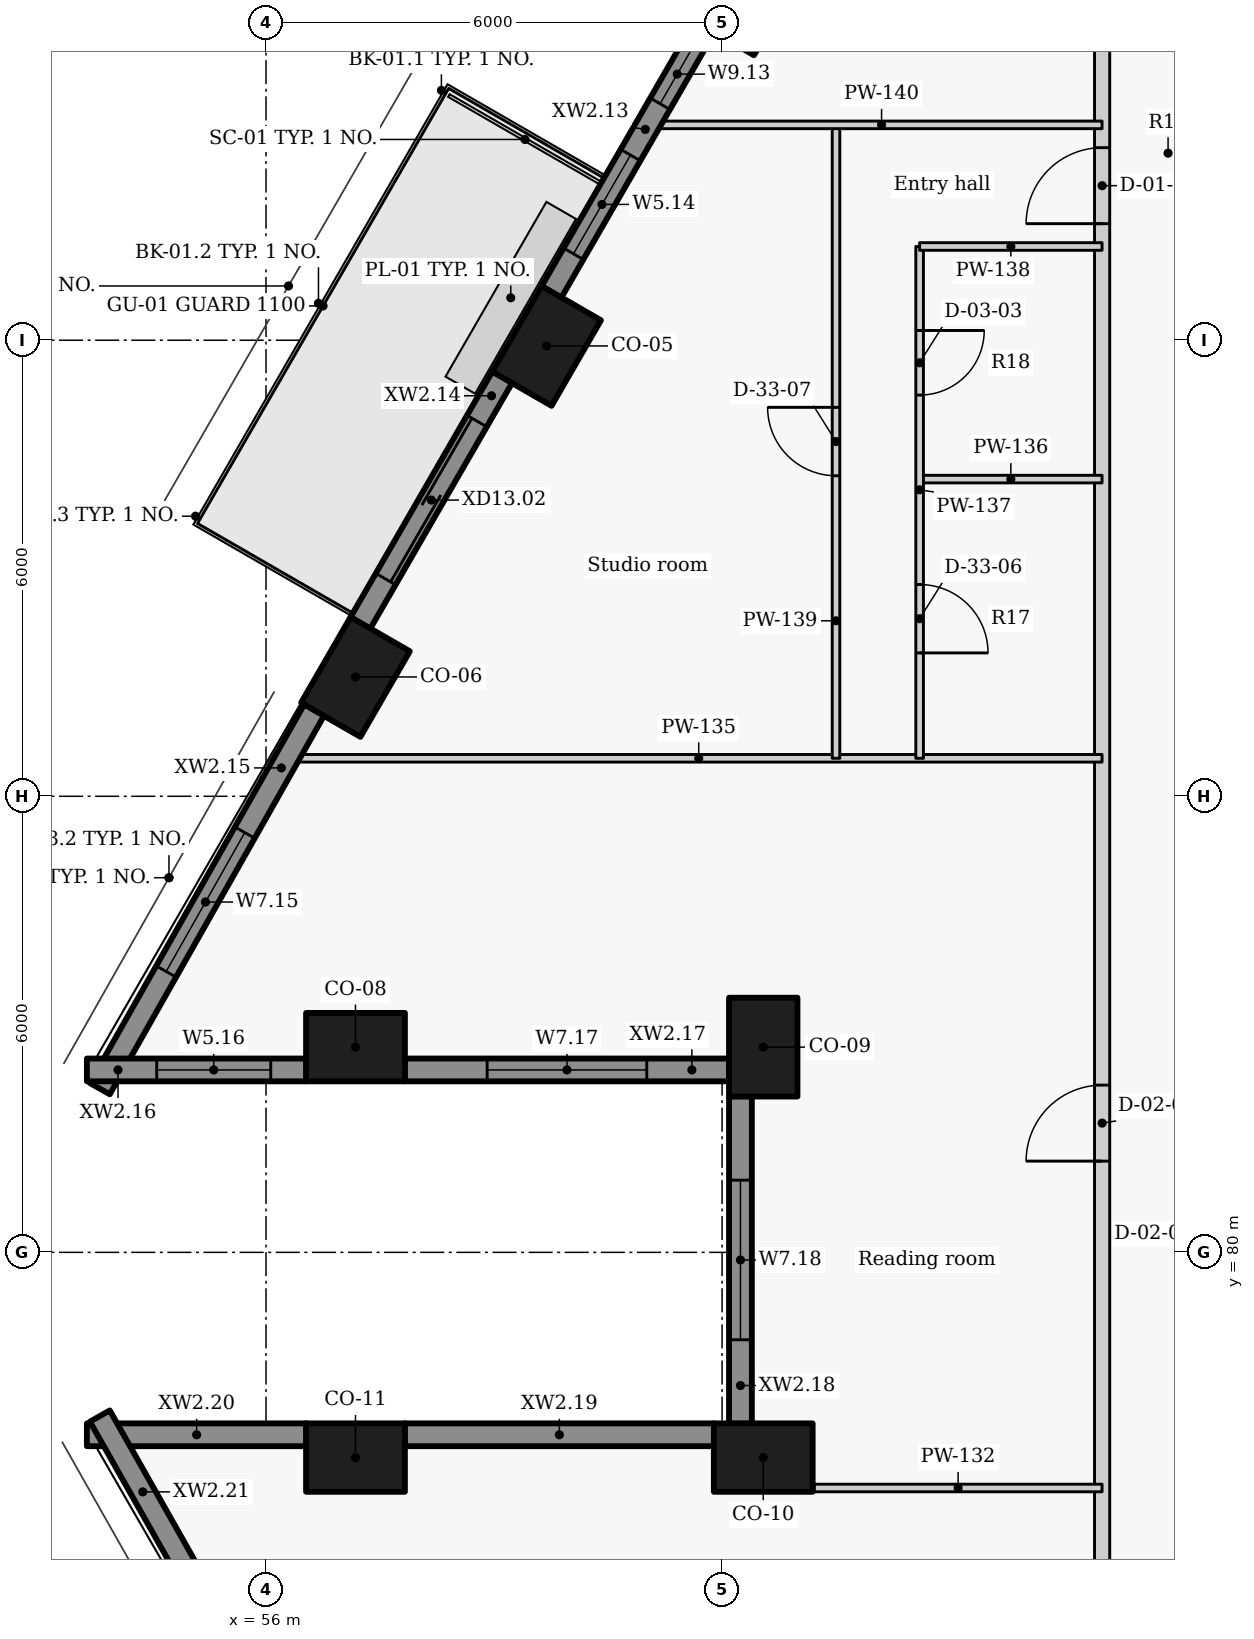
"""IFC4 building model, lengths in metres.
Left out: names, types, materials, properties, quantities, classifications, styles, units other than length and angle.
Written with IfcOpenShell. Run it as: python <this file> out.ifc"""

import sys

from ifc_helpers import new_model, si_unit, direction, frame, frame_2d, origin, origin_2d, place, context, subcontext, project, spatial, rectangle, extrude, element, fill, save


model = new_model("IFC4")
c1 = context("Model", 3, precision=1e-05, world=origin(), true_north=direction((0.0, 1.0)))
c2 = subcontext(c1, "Body", "Model", "MODEL_VIEW")
j1 = project(units=[si_unit("LENGTHUNIT", "METRE"), si_unit("PLANEANGLEUNIT", "RADIAN")], contexts=[c1])
p1 = place(None, origin())
s1 = spatial("IfcSite", under=j1, at=p1, CompositionType="ELEMENT")
p2 = place(p1, origin())
s2 = spatial("IfcBuilding", under=s1, at=p2, CompositionType="ELEMENT")
p3 = place(p2, frame((0.0, 0.0, 127.2)))
s3 = spatial("IfcBuildingStorey", under=s2, at=p3, CompositionType="ELEMENT", Elevation=127.2)
for number, where, z_axis, x_axis in (
    (1, (62.354, 96.537, 0.0), (0.0, 0.0, 1.0), (-0.5, -0.866, 0.0)),
    (2, (59.692, 91.925, 0.0), (0.0, 0.0, 1.0), (-0.5, -0.866, 0.0)),
    (3, (57.177, 87.57, 0.0), (0.0, 0.0, 1.0), (-0.5, -0.866, 0.0)),
    (4, (57.177, 82.7, 0.0), (0.0, 0.0, 1.0), (1.0, 0.0, 0.0)),
    (5, (62.542, 82.7, 0.0), (0.0, 0.0, 1.0), (0.0, -1.0, 0.0)),
    (6, (62.542, 77.3, 0.0), (0.0, 0.0, 1.0), (-1.0, 0.0, 0.0)),
    (7, (57.177, 77.3, 0.0), (0.0, 0.0, 1.0), (-1.0, 0.0, 0.0)),
):
    element("IfcColumn", number, at=place(p3, frame(where, z_axis=z_axis, x_axis=x_axis)), inside=s3, PredefinedType="COLUMN", context=c2, shape_type="SweptSolid", body=[
        extrude(rectangle(XDim=1.3, YDim=0.9, at=origin_2d()), origin(), (0.0, 0.0, 1.0), 3.3),
    ])
p4 = place(p3, frame((61.772, 96.128, 0.0), z_axis=(0.0, 0.0, 1.0), x_axis=(-0.500031546601, -0.86600718958, 0.0)))
e8 = element("IfcWall", 8, at=p4, inside=s3, PredefinedType="SOLIDWALL", context=c2, shape_type="SweptSolid", body=[
    extrude(rectangle(XDim=4.034, YDim=0.3, at=frame_2d((2.017, 0.0))), origin(), (0.0, 0.0, 1.0), 2.425),
])
p5 = place(p4, frame((0.274, 0.0, 0.9)))
e9 = element("IfcOpeningElement", 9, at=p5, cuts=e8, PredefinedType="OPENING", context=c2, shape_type="SweptSolid", body=[
    extrude(rectangle(XDim=0.9, YDim=1.1, at=frame_2d((0.45, 0.55))), frame((0.0, 0.16, 0.0), z_axis=(0.0, -1.0, 0.0), x_axis=(1.0, 0.0, 0.0)), (0.0, 0.0, 1.0), 0.32),
])
p6 = place(p4, frame((1.953, 0.0, 0.9)))
e10 = element("IfcOpeningElement", 10, at=p6, cuts=e8, PredefinedType="OPENING", context=c2, shape_type="SweptSolid", body=[
    extrude(rectangle(XDim=1.5, YDim=1.1, at=frame_2d((0.75, 0.55))), frame((0.0, 0.16, 0.0), z_axis=(0.0, -1.0, 0.0), x_axis=(1.0, 0.0, 0.0)), (0.0, 0.0, 1.0), 0.32),
])
p7 = place(p3, frame((59.109, 91.515, 0.0), z_axis=(0.0, 0.0, 1.0), x_axis=(-0.499933594891, -0.866063739398, 0.0)))
e11 = element("IfcWall", 11, at=p7, inside=s3, PredefinedType="SOLIDWALL", context=c2, shape_type="SweptSolid", body=[
    extrude(rectangle(XDim=3.737, YDim=0.3, at=frame_2d((1.868, 0.0))), origin(), (0.0, 0.0, 1.0), 2.425),
])
p8 = place(p7, frame((0.668, 0.0, 0.0)))
e12 = element("IfcOpeningElement", 12, at=p8, cuts=e11, PredefinedType="OPENING", context=c2, shape_type="SweptSolid", body=[
    extrude(rectangle(XDim=2.4, YDim=2.0, at=frame_2d((1.2, 1.0))), frame((0.0, 0.16, 0.0), z_axis=(0.0, -1.0, 0.0), x_axis=(1.0, 0.0, 0.0)), (0.0, 0.0, 1.0), 0.32),
])
p9 = place(p3, frame((56.634, 87.137, 0.0), z_axis=(0.0, 0.0, 1.0), x_axis=(-0.492498306264, -0.87031340236, 0.0)))
e13 = element("IfcWall", 13, at=p9, inside=s3, PredefinedType="SOLIDWALL", context=c2, shape_type="SweptSolid", body=[
    extrude(rectangle(XDim=5.727, YDim=0.3, at=frame_2d((2.863, 0.0))), origin(), (0.0, 0.0, 1.0), 2.425),
])
p10 = place(p9, frame((1.855, 0.0, 0.9)))
e14 = element("IfcOpeningElement", 14, at=p10, cuts=e13, PredefinedType="OPENING", context=c2, shape_type="SweptSolid", body=[
    extrude(rectangle(XDim=2.1, YDim=1.1, at=frame_2d((1.05, 0.55))), frame((0.0, 0.16, 0.0), z_axis=(0.0, -1.0, 0.0), x_axis=(1.0, 0.0, 0.0)), (0.0, 0.0, 1.0), 0.32),
])
p11 = place(p3, frame((53.643, 82.4, 0.0), z_axis=(0.0, 0.0, 1.0), x_axis=(1.0, 0.0, 0.0)))
e15 = element("IfcWall", 15, at=p11, inside=s3, PredefinedType="SOLIDWALL", context=c2, shape_type="SweptSolid", body=[
    extrude(rectangle(XDim=2.888, YDim=0.3, at=frame_2d((1.444, 0.0))), origin(), (0.0, 0.0, 1.0), 2.425),
])
p12 = place(p11, frame((0.919, 0.0, 0.9)))
e16 = element("IfcOpeningElement", 16, at=p12, cuts=e15, PredefinedType="OPENING", context=c2, shape_type="SweptSolid", body=[
    extrude(rectangle(XDim=1.5, YDim=1.1, at=frame_2d((0.75, 0.55))), frame((0.0, 0.16, 0.0), z_axis=(0.0, -1.0, 0.0), x_axis=(1.0, 0.0, 0.0)), (0.0, 0.0, 1.0), 0.32),
])
p13 = place(p3, frame((57.823, 82.4, 0.0), z_axis=(0.0, 0.0, 1.0), x_axis=(1.0, 0.0, 0.0)))
e17 = element("IfcWall", 17, at=p13, inside=s3, PredefinedType="SOLIDWALL", context=c2, shape_type="SweptSolid", body=[
    extrude(rectangle(XDim=4.273, YDim=0.3, at=frame_2d((2.136, 0.0))), origin(), (0.0, 0.0, 1.0), 2.425),
])
p14 = place(p13, frame((1.086, 0.0, 0.9)))
e18 = element("IfcOpeningElement", 18, at=p14, cuts=e17, PredefinedType="OPENING", context=c2, shape_type="SweptSolid", body=[
    extrude(rectangle(XDim=2.1, YDim=1.1, at=frame_2d((1.05, 0.55))), frame((0.0, 0.16, 0.0), z_axis=(0.0, -1.0, 0.0), x_axis=(1.0, 0.0, 0.0)), (0.0, 0.0, 1.0), 0.32),
])
p15 = place(p3, frame((62.242, 82.054, 0.0), z_axis=(0.0, 0.0, 1.0), x_axis=(0.0, -1.0, 0.0)))
e19 = element("IfcWall", 19, at=p15, inside=s3, PredefinedType="SOLIDWALL", context=c2, shape_type="SweptSolid", body=[
    extrude(rectangle(XDim=4.308, YDim=0.3, at=frame_2d((2.154, 0.0))), origin(), (0.0, 0.0, 1.0), 2.425),
])
p16 = place(p15, frame((1.104, 0.0, 0.9)))
e20 = element("IfcOpeningElement", 20, at=p16, cuts=e19, PredefinedType="OPENING", context=c2, shape_type="SweptSolid", body=[
    extrude(rectangle(XDim=2.1, YDim=1.1, at=frame_2d((1.05, 0.55))), frame((0.0, 0.16, 0.0), z_axis=(0.0, -1.0, 0.0), x_axis=(1.0, 0.0, 0.0)), (0.0, 0.0, 1.0), 0.32),
])
p17 = place(p3, frame((61.896, 77.6, 0.0), z_axis=(0.0, 0.0, 1.0), x_axis=(-1.0, 0.0, 0.0)))
e21 = element("IfcWall", 21, at=p17, inside=s3, PredefinedType="SOLIDWALL", context=c2, shape_type="SweptSolid", body=[
    extrude(rectangle(XDim=4.073, YDim=0.3, at=frame_2d((2.036, 0.0))), origin(), (0.0, 0.0, 1.0), 2.425),
])
p18 = place(p3, frame((56.531, 77.6, 0.0), z_axis=(0.0, 0.0, 1.0), x_axis=(-1.0, 0.0, 0.0)))
e22 = element("IfcWall", 22, at=p18, inside=s3, PredefinedType="SOLIDWALL", context=c2, shape_type="SweptSolid", body=[
    extrude(rectangle(XDim=2.888, YDim=0.3, at=frame_2d((1.444, 0.0))), origin(), (0.0, 0.0, 1.0), 2.425),
])
p19 = place(p3, frame((53.814, 77.847, 0.0), z_axis=(0.0, 0.0, 1.0), x_axis=(0.492498306264, -0.87031340236, 0.0)))
e23 = element("IfcWall", 23, at=p19, inside=s3, PredefinedType="SOLIDWALL", context=c2, shape_type="SweptSolid", body=[
    extrude(rectangle(XDim=5.727, YDim=0.3, at=frame_2d((2.863, 0.0))), origin(), (0.0, 0.0, 1.0), 2.425),
])
p20 = place(p19, frame((2.392, 0.0, 0.9)))
e24 = element("IfcOpeningElement", 24, at=p20, cuts=e23, PredefinedType="OPENING", context=c2, shape_type="SweptSolid", body=[
    extrude(rectangle(XDim=2.1, YDim=1.1, at=frame_2d((1.05, 0.55))), frame((0.0, 0.16, 0.0), z_axis=(0.0, -1.0, 0.0), x_axis=(1.0, 0.0, 0.0)), (0.0, 0.0, 1.0), 0.32),
])
p21 = place(p3, frame((67.0, 56.833, 0.0), z_axis=(0.0, 0.0, 1.0), x_axis=(0.0, 1.0, 0.0)))
e25 = element("IfcWall", 25, at=p21, inside=s3, PredefinedType="PARTITIONING", context=c2, shape_type="SweptSolid", body=[
    extrude(rectangle(XDim=45.661, YDim=0.2, at=frame_2d((22.831, 0.0))), origin(), (0.0, 0.0, 1.0), 2.405),
])
p22 = place(p21, frame((9.534, 0.0, 0.0)))
e26 = element("IfcOpeningElement", 26, at=p22, cuts=e25, PredefinedType="OPENING", context=c2, shape_type="SweptSolid", body=[
    extrude(rectangle(XDim=1.0, YDim=2.1, at=frame_2d((0.5, 1.05))), frame((0.0, 0.11, 0.0), z_axis=(0.0, -1.0, 0.0), x_axis=(1.0, 0.0, 0.0)), (0.0, 0.0, 1.0), 0.22),
])
p23 = place(p21, frame((24.367, 0.0, 0.0)))
e27 = element("IfcOpeningElement", 27, at=p23, cuts=e25, PredefinedType="OPENING", context=c2, shape_type="SweptSolid", body=[
    extrude(rectangle(XDim=1.0, YDim=2.1, at=frame_2d((0.5, 1.05))), frame((0.0, 0.11, 0.0), z_axis=(0.0, -1.0, 0.0), x_axis=(1.0, 0.0, 0.0)), (0.0, 0.0, 1.0), 0.22),
])
p24 = place(p21, frame((36.7, 0.0, 0.0)))
e28 = element("IfcOpeningElement", 28, at=p24, cuts=e25, PredefinedType="OPENING", context=c2, shape_type="SweptSolid", body=[
    extrude(rectangle(XDim=1.0, YDim=2.1, at=frame_2d((0.5, 1.05))), frame((0.0, 0.11, 0.0), z_axis=(0.0, -1.0, 0.0), x_axis=(1.0, 0.0, 0.0)), (0.0, 0.0, 1.0), 0.22),
])
p25 = place(p21, frame((41.328, 0.0, 0.0)))
e29 = element("IfcOpeningElement", 29, at=p25, cuts=e25, PredefinedType="OPENING", context=c2, shape_type="SweptSolid", body=[
    extrude(rectangle(XDim=1.0, YDim=2.1, at=frame_2d((0.5, 1.05))), frame((0.0, 0.11, 0.0), z_axis=(0.0, -1.0, 0.0), x_axis=(1.0, 0.0, 0.0)), (0.0, 0.0, 1.0), 0.22),
])
p26 = place(p3, frame((63.212, 76.9, 0.0), z_axis=(0.0, 0.0, 1.0), x_axis=(1.0, 0.0, 0.0)))
e30 = element("IfcWall", 30, at=p26, inside=s3, PredefinedType="PARTITIONING", context=c2, shape_type="SweptSolid", body=[
    extrude(rectangle(XDim=3.787, YDim=0.1, at=frame_2d((1.894, 0.0))), origin(), (0.0, 0.0, 1.0), 3.025),
])
p27 = place(p3, frame((56.386, 86.5, 0.0), z_axis=(0.0, 0.0, 1.0), x_axis=(1.0, 0.0, 0.0)))
e31 = element("IfcWall", 31, at=p27, inside=s3, PredefinedType="PARTITIONING", context=c2, shape_type="SweptSolid", body=[
    extrude(rectangle(XDim=10.613, YDim=0.1, at=frame_2d((5.306, 0.0))), origin(), (0.0, 0.0, 1.0), 2.405),
])
p28 = place(p3, frame((64.599, 90.173, 0.0), z_axis=(0.0, 0.0, 1.0), x_axis=(1.0, 0.0, 0.0)))
e32 = element("IfcWall", 32, at=p28, inside=s3, PredefinedType="PARTITIONING", context=c2, shape_type="SweptSolid", body=[
    extrude(rectangle(XDim=2.4, YDim=0.1, at=frame_2d((1.2, 0.0))), origin(), (0.0, 0.0, 1.0), 3.025),
])
p29 = place(p3, frame((64.599, 93.233, 0.0), z_axis=(0.0, 0.0, 1.0), x_axis=(0.0, -1.0, 0.0)))
e33 = element("IfcWall", 33, at=p29, inside=s3, PredefinedType="PARTITIONING", context=c2, shape_type="SweptSolid", body=[
    extrude(rectangle(XDim=6.733, YDim=0.1, at=frame_2d((3.367, 0.0))), origin(), (0.0, 0.0, 1.0), 3.025),
])
p30 = place(p29, frame((4.447, 0.0, 0.0)))
e34 = element("IfcOpeningElement", 34, at=p30, cuts=e33, PredefinedType="OPENING", context=c2, shape_type="SweptSolid", body=[
    extrude(rectangle(XDim=0.9, YDim=2.1, at=frame_2d((0.45, 1.05))), frame((0.0, 0.06, 0.0), z_axis=(0.0, -1.0, 0.0), x_axis=(1.0, 0.0, 0.0)), (0.0, 0.0, 1.0), 0.12),
])
p31 = place(p29, frame((1.105, 0.0, 0.0)))
e35 = element("IfcOpeningElement", 35, at=p31, cuts=e33, PredefinedType="OPENING", context=c2, shape_type="SweptSolid", body=[
    extrude(rectangle(XDim=0.85, YDim=2.1, at=frame_2d((0.425, 1.05))), frame((0.0, 0.06, 0.0), z_axis=(0.0, -1.0, 0.0), x_axis=(1.0, 0.0, 0.0)), (0.0, 0.0, 1.0), 0.12),
])
p32 = place(p3, frame((64.599, 93.233, 0.0), z_axis=(0.0, 0.0, 1.0), x_axis=(1.0, 0.0, 0.0)))
e36 = element("IfcWall", 36, at=p32, inside=s3, PredefinedType="PARTITIONING", context=c2, shape_type="SweptSolid", body=[
    extrude(rectangle(XDim=2.4, YDim=0.1, at=frame_2d((1.2, 0.0))), origin(), (0.0, 0.0, 1.0), 3.025),
])
p33 = place(p3, frame((63.499, 86.5, 0.0), z_axis=(0.0, 0.0, 1.0), x_axis=(0.0, 1.0, 0.0)))
e37 = element("IfcWall", 37, at=p33, inside=s3, PredefinedType="PARTITIONING", context=c2, shape_type="SweptSolid", body=[
    extrude(rectangle(XDim=8.333, YDim=0.1, at=frame_2d((4.167, 0.0))), origin(), (0.0, 0.0, 1.0), 3.025),
])
p34 = place(p33, frame((3.717, 0.0, 0.0)))
e38 = element("IfcOpeningElement", 38, at=p34, cuts=e37, PredefinedType="OPENING", context=c2, shape_type="SweptSolid", body=[
    extrude(rectangle(XDim=0.9, YDim=2.1, at=frame_2d((0.45, 1.05))), frame((0.0, 0.06, 0.0), z_axis=(0.0, -1.0, 0.0), x_axis=(1.0, 0.0, 0.0)), (0.0, 0.0, 1.0), 0.12),
])
p35 = place(p3, frame((61.198, 94.833, 0.0), z_axis=(0.0, 0.0, 1.0), x_axis=(1.0, 0.0, 0.0)))
e39 = element("IfcWall", 39, at=p35, inside=s3, PredefinedType="PARTITIONING", context=c2, shape_type="SweptSolid", body=[
    extrude(rectangle(XDim=5.802, YDim=0.1, at=frame_2d((2.901, 0.0))), origin(), (0.0, 0.0, 1.0), 2.405),
])
p36 = place(p5, origin())
e40 = element("IfcWindow", 40, at=p36, inside=s3, PartitioningType="SINGLE_PANEL", PredefinedType="WINDOW", context=c2, shape_type="SweptSolid", body=[
    extrude(rectangle(XDim=0.9, YDim=1.1, at=frame_2d((0.45, 0.55))), frame((0.0, 0.03, 0.0), z_axis=(0.0, -1.0, 0.0), x_axis=(1.0, 0.0, 0.0)), (0.0, 0.0, 1.0), 0.06),
])
fill(e9, e40)
p37 = place(p6, origin())
e41 = element("IfcWindow", 41, at=p37, inside=s3, PartitioningType="SINGLE_PANEL", PredefinedType="WINDOW", context=c2, shape_type="SweptSolid", body=[
    extrude(rectangle(XDim=1.5, YDim=1.1, at=frame_2d((0.75, 0.55))), frame((0.0, 0.03, 0.0), z_axis=(0.0, -1.0, 0.0), x_axis=(1.0, 0.0, 0.0)), (0.0, 0.0, 1.0), 0.06),
])
fill(e10, e41)
p38 = place(p8, origin())
e42 = element("IfcDoor", 42, at=p38, inside=s3, OperationType="DOUBLE_DOOR_SLIDING", PredefinedType="DOOR", context=c2, shape_type="SweptSolid", body=[
    extrude(rectangle(XDim=2.4, YDim=2.0, at=frame_2d((1.2, 1.0))), frame((0.0, 0.025, 0.0), z_axis=(0.0, -1.0, 0.0), x_axis=(1.0, 0.0, 0.0)), (0.0, 0.0, 1.0), 0.05),
])
fill(e12, e42)
p39 = place(p10, origin())
e43 = element("IfcWindow", 43, at=p39, inside=s3, PartitioningType="SINGLE_PANEL", PredefinedType="WINDOW", context=c2, shape_type="SweptSolid", body=[
    extrude(rectangle(XDim=2.1, YDim=1.1, at=frame_2d((1.05, 0.55))), frame((0.0, 0.03, 0.0), z_axis=(0.0, -1.0, 0.0), x_axis=(1.0, 0.0, 0.0)), (0.0, 0.0, 1.0), 0.06),
])
fill(e14, e43)
p40 = place(p12, origin())
e44 = element("IfcWindow", 44, at=p40, inside=s3, PartitioningType="SINGLE_PANEL", PredefinedType="WINDOW", context=c2, shape_type="SweptSolid", body=[
    extrude(rectangle(XDim=1.5, YDim=1.1, at=frame_2d((0.75, 0.55))), frame((0.0, 0.03, 0.0), z_axis=(0.0, -1.0, 0.0), x_axis=(1.0, 0.0, 0.0)), (0.0, 0.0, 1.0), 0.06),
])
fill(e16, e44)
p41 = place(p14, origin())
e45 = element("IfcWindow", 45, at=p41, inside=s3, PartitioningType="SINGLE_PANEL", PredefinedType="WINDOW", context=c2, shape_type="SweptSolid", body=[
    extrude(rectangle(XDim=2.1, YDim=1.1, at=frame_2d((1.05, 0.55))), frame((0.0, 0.03, 0.0), z_axis=(0.0, -1.0, 0.0), x_axis=(1.0, 0.0, 0.0)), (0.0, 0.0, 1.0), 0.06),
])
fill(e18, e45)
p42 = place(p16, origin())
e46 = element("IfcWindow", 46, at=p42, inside=s3, PartitioningType="SINGLE_PANEL", PredefinedType="WINDOW", context=c2, shape_type="SweptSolid", body=[
    extrude(rectangle(XDim=2.1, YDim=1.1, at=frame_2d((1.05, 0.55))), frame((0.0, 0.03, 0.0), z_axis=(0.0, -1.0, 0.0), x_axis=(1.0, 0.0, 0.0)), (0.0, 0.0, 1.0), 0.06),
])
fill(e20, e46)
p43 = place(p23, origin())
e47 = element("IfcDoor", 47, at=p43, inside=s3, OperationType="SINGLE_SWING_LEFT", PredefinedType="DOOR", context=c2, shape_type="SweptSolid", body=[
    extrude(rectangle(XDim=1.0, YDim=2.1, at=frame_2d((0.5, 1.05))), frame((0.0, 0.025, 0.0), z_axis=(0.0, -1.0, 0.0), x_axis=(1.0, 0.0, 0.0)), (0.0, 0.0, 1.0), 0.05),
])
fill(e27, e47)
p44 = place(p24, origin())
e48 = element("IfcDoor", 48, at=p44, inside=s3, OperationType="SINGLE_SWING_LEFT", PredefinedType="DOOR", context=c2, shape_type="SweptSolid", body=[
    extrude(rectangle(XDim=1.0, YDim=2.1, at=frame_2d((0.5, 1.05))), frame((0.0, 0.025, 0.0), z_axis=(0.0, -1.0, 0.0), x_axis=(1.0, 0.0, 0.0)), (0.0, 0.0, 1.0), 0.05),
])
fill(e28, e48)
p45 = place(p30, origin())
e49 = element("IfcDoor", 49, at=p45, inside=s3, OperationType="SINGLE_SWING_RIGHT", PredefinedType="DOOR", context=c2, shape_type="SweptSolid", body=[
    extrude(rectangle(XDim=0.9, YDim=2.1, at=frame_2d((0.45, 1.05))), frame((0.0, 0.025, 0.0), z_axis=(0.0, -1.0, 0.0), x_axis=(1.0, 0.0, 0.0)), (0.0, 0.0, 1.0), 0.05),
])
fill(e34, e49)
p46 = place(p31, origin())
e50 = element("IfcDoor", 50, at=p46, inside=s3, OperationType="SINGLE_SWING_LEFT", PredefinedType="DOOR", context=c2, shape_type="SweptSolid", body=[
    extrude(rectangle(XDim=0.85, YDim=2.1, at=frame_2d((0.425, 1.05))), frame((0.0, 0.025, 0.0), z_axis=(0.0, -1.0, 0.0), x_axis=(1.0, 0.0, 0.0)), (0.0, 0.0, 1.0), 0.05),
])
fill(e35, e50)
p47 = place(p34, origin())
e51 = element("IfcDoor", 51, at=p47, inside=s3, OperationType="SINGLE_SWING_RIGHT", PredefinedType="DOOR", context=c2, shape_type="SweptSolid", body=[
    extrude(rectangle(XDim=0.9, YDim=2.1, at=frame_2d((0.45, 1.05))), frame((0.0, 0.025, 0.0), z_axis=(0.0, -1.0, 0.0), x_axis=(1.0, 0.0, 0.0)), (0.0, 0.0, 1.0), 0.05),
])
fill(e38, e51)
save(model, sys.argv[1])
